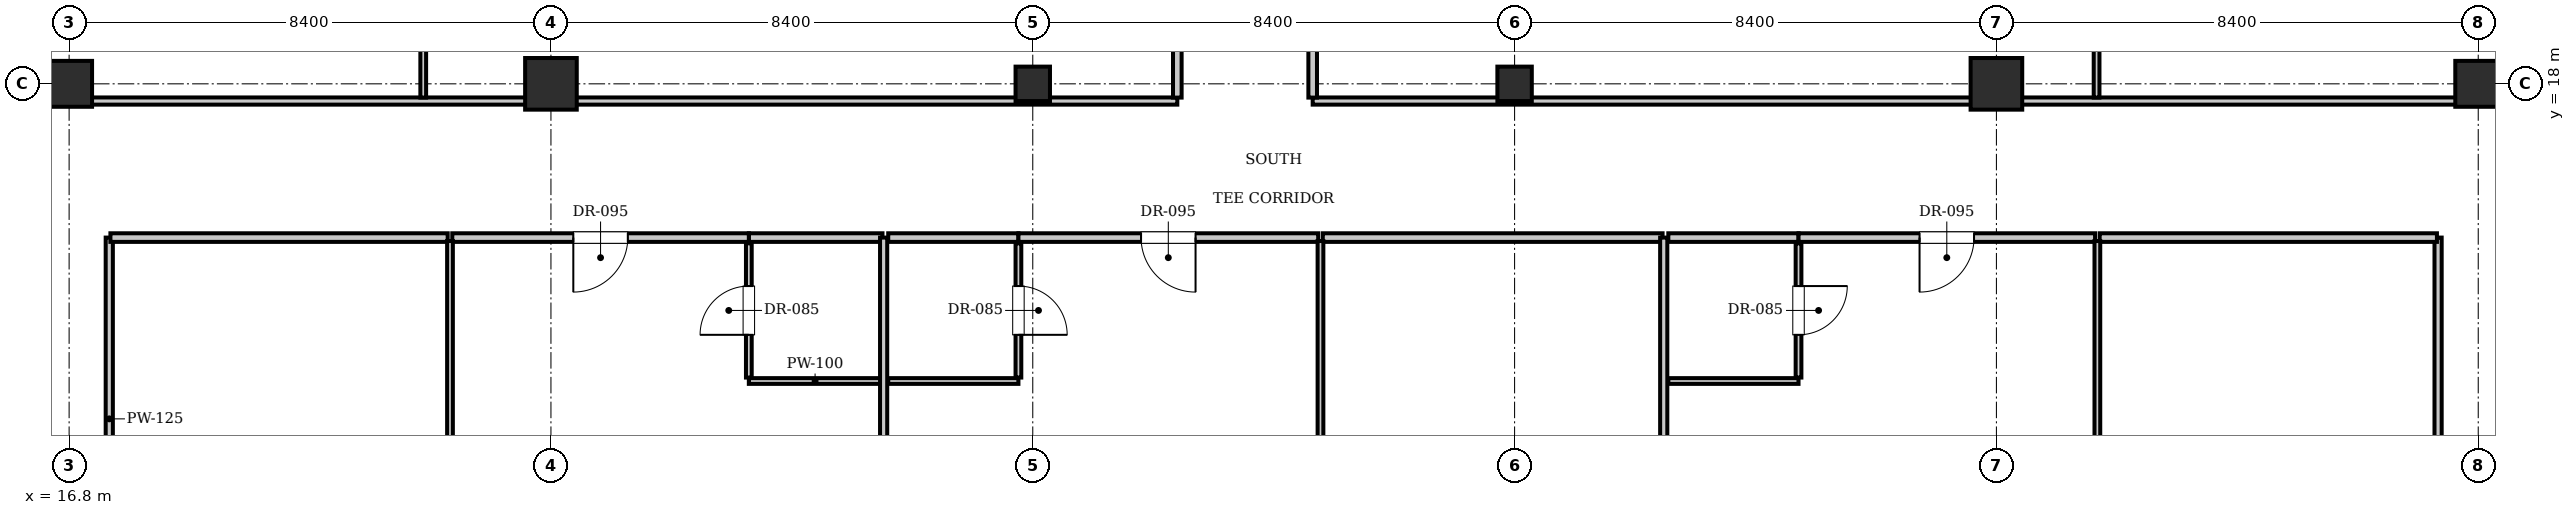
"""IFC4 building model, lengths in metres.
Left out: names, types, materials, properties, quantities, classifications, styles, units other than length and angle.
Written with IfcOpenShell. Run it as: python <this file> out.ifc"""

import sys

from ifc_helpers import new_model, si_unit, direction, frame, frame_2d, origin, origin_2d, place, context, subcontext, project, spatial, rectangle, i_section, extrude, element, fill, save


model = new_model("IFC4")
c1 = context("Model", 3, precision=1e-05, world=origin(), true_north=direction((0.0, 1.0)))
c2 = subcontext(c1, "Body", "Model", "MODEL_VIEW")
j1 = project(units=[si_unit("LENGTHUNIT", "METRE"), si_unit("PLANEANGLEUNIT", "RADIAN")], contexts=[c1])
p1 = place(None, origin())
s1 = spatial("IfcSite", under=j1, at=p1, CompositionType="ELEMENT")
p2 = place(p1, origin())
s2 = spatial("IfcBuilding", under=s1, at=p2, CompositionType="ELEMENT")
p3 = place(p2, frame((0.0, 0.0, 165.9)))
s3 = spatial("IfcBuildingStorey", under=s2, at=p3, CompositionType="ELEMENT", Elevation=165.9)
for number, where, z_axis, x_axis in (
    (1, (25.2, 18.0, 0.0), (0.0, 0.0, 1.0), (1.0, 0.0, 0.0)),
    (2, (50.4, 18.0, 0.0), (0.0, 0.0, 1.0), (1.0, 0.0, 0.0)),
):
    element("IfcColumn", number, at=place(p3, frame(where, z_axis=z_axis, x_axis=x_axis)), inside=s3, PredefinedType="COLUMN", context=c2, shape_type="SweptSolid", body=[
        extrude(rectangle(XDim=0.9, YDim=0.9, at=origin_2d()), origin(), (0.0, 0.0, 1.0), 3.85),
    ])
for number, where, z_axis, x_axis in (
    (3, (33.6, 18.0, 0.0), (0.0, 0.0, 1.0), (1.0, 0.0, 0.0)),
    (4, (42.0, 18.0, 0.0), (0.0, 0.0, 1.0), (1.0, 0.0, 0.0)),
):
    element("IfcColumn", number, at=place(p3, frame(where, z_axis=z_axis, x_axis=x_axis)), inside=s3, PredefinedType="COLUMN", context=c2, shape_type="SweptSolid", body=[
        extrude(i_section(OverallWidth=0.6, OverallDepth=0.6, WebThickness=0.025, FlangeThickness=0.038, at=origin_2d()), origin(), (0.0, 0.0, 1.0), 3.85),
    ])
for number, where, z_axis, x_axis in (
    (5, (16.8, 18.0, 0.0), (0.0, 0.0, 1.0), (1.0, 0.0, 0.0)),
    (6, (58.8, 18.0, 0.0), (0.0, 0.0, 1.0), (1.0, 0.0, 0.0)),
):
    element("IfcColumn", number, at=place(p3, frame(where, z_axis=z_axis, x_axis=x_axis)), inside=s3, PredefinedType="COLUMN", context=c2, shape_type="SweptSolid", body=[
        extrude(rectangle(XDim=0.8, YDim=0.8, at=origin_2d()), origin(), (0.0, 0.0, 1.0), 3.85),
    ])
for number, where, z_axis, x_axis in (
    (7, (17.5, 9.0, 0.0), (0.0, 0.0, 1.0), (0.0, 1.0, 0.0)),
    (8, (58.1, 9.0, 0.0), (0.0, 0.0, 1.0), (0.0, 1.0, 0.0)),
):
    element("IfcWall", number, at=place(p3, frame(where, z_axis=z_axis, x_axis=x_axis)), inside=s3, PredefinedType="PARTITIONING", context=c2, shape_type="SweptSolid", body=[
        extrude(rectangle(XDim=6.32, YDim=0.125, at=frame_2d((3.16, 0.0))), origin(), (0.0, 0.0, 1.0), 3.61),
    ])
p4 = place(p3, frame((28.65, 15.32, 0.0), z_axis=(0.0, 0.0, 1.0), x_axis=(1.0, 0.0, 0.0)))
e9 = element("IfcWall", 9, at=p4, inside=s3, PredefinedType="PARTITIONING", context=c2, shape_type="SweptSolid", body=[
    extrude(rectangle(XDim=2.33, YDim=0.15, at=frame_2d((1.165, 0.0))), origin(), (0.0, 0.0, 1.0), 3.61),
])
p5 = place(p3, frame((28.65, 12.82, 0.0), z_axis=(0.0, 0.0, 1.0), x_axis=(1.0, 0.0, 0.0)))
e10 = element("IfcWall", 10, at=p5, inside=s3, PredefinedType="PARTITIONING", context=c2, shape_type="SweptSolid", body=[
    extrude(rectangle(XDim=2.31, YDim=0.1, at=frame_2d((1.155, 0.0))), origin(), (0.0, 0.0, 1.0), 3.61),
])
p6 = place(p3, frame((28.65, 12.88, 0.0), z_axis=(0.0, 0.0, 1.0), x_axis=(0.0, 1.0, 0.0)))
e11 = element("IfcWall", 11, at=p6, inside=s3, PredefinedType="PARTITIONING", context=c2, shape_type="SweptSolid", body=[
    extrude(rectangle(XDim=2.34, YDim=0.1, at=frame_2d((1.17, 0.0))), origin(), (0.0, 0.0, 1.0), 3.61),
])
p7 = place(p6, frame((0.745, 0.0, 0.0)))
e12 = element("IfcOpeningElement", 12, at=p7, cuts=e11, PredefinedType="OPENING", context=c2, shape_type="SweptSolid", body=[
    extrude(rectangle(XDim=0.85, YDim=2.1, at=frame_2d((0.425, 1.05))), frame((0.0, 0.06, 0.0), z_axis=(0.0, -1.0, 0.0), x_axis=(1.0, 0.0, 0.0)), (0.0, 0.0, 1.0), 0.12),
])
p8 = place(p3, frame((17.52, 15.32, 0.0), z_axis=(0.0, 0.0, 1.0), x_axis=(1.0, 0.0, 0.0)))
e13 = element("IfcWall", 13, at=p8, inside=s3, PredefinedType="PARTITIONING", context=c2, shape_type="SweptSolid", body=[
    extrude(rectangle(XDim=5.88, YDim=0.15, at=frame_2d((2.94, 0.0))), origin(), (0.0, 0.0, 1.0), 3.61),
])
p9 = place(p3, frame((23.48, 15.32, 0.0), z_axis=(0.0, 0.0, 1.0), x_axis=(1.0, 0.0, 0.0)))
e14 = element("IfcWall", 14, at=p9, inside=s3, PredefinedType="PARTITIONING", context=c2, shape_type="SweptSolid", body=[
    extrude(rectangle(XDim=5.17, YDim=0.15, at=frame_2d((2.585, 0.0))), origin(), (0.0, 0.0, 1.0), 3.61),
])
p10 = place(p9, frame((2.11, 0.0, 0.0)))
e15 = element("IfcOpeningElement", 15, at=p10, cuts=e14, PredefinedType="OPENING", context=c2, shape_type="SweptSolid", body=[
    extrude(rectangle(XDim=0.95, YDim=2.15, at=frame_2d((0.475, 1.075))), frame((0.0, 0.085, 0.0), z_axis=(0.0, -1.0, 0.0), x_axis=(1.0, 0.0, 0.0)), (0.0, 0.0, 1.0), 0.17),
])
p11 = place(p3, frame((23.44, 4.63, 0.0), z_axis=(0.0, 0.0, 1.0), x_axis=(0.0, 1.0, 0.0)))
e16 = element("IfcWall", 16, at=p11, inside=s3, PredefinedType="PARTITIONING", context=c2, shape_type="SweptSolid", body=[
    extrude(rectangle(XDim=10.63, YDim=0.1, at=frame_2d((5.315, 0.0))), origin(), (0.0, 0.0, 1.0), 3.61),
])
p12 = place(p11, frame((1.6, 0.0, 0.0)))
e17 = element("IfcOpeningElement", 17, at=p12, cuts=e16, PredefinedType="OPENING", context=c2, shape_type="SweptSolid", body=[
    extrude(rectangle(XDim=0.9, YDim=2.1, at=frame_2d((0.45, 1.05))), frame((0.0, 0.06, 0.0), z_axis=(0.0, -1.0, 0.0), x_axis=(1.0, 0.0, 0.0)), (0.0, 0.0, 1.0), 0.12),
])
p13 = place(p3, frame((31.0, 4.7, 0.0), z_axis=(0.0, 0.0, 1.0), x_axis=(0.0, 1.0, 0.0)))
e18 = element("IfcWall", 18, at=p13, inside=s3, PredefinedType="PARTITIONING", context=c2, shape_type="SweptSolid", body=[
    extrude(rectangle(XDim=10.62, YDim=0.125, at=frame_2d((5.31, 0.0))), origin(), (0.0, 0.0, 1.0), 3.61),
])
p14 = place(p3, frame((31.08, 15.32, 0.0), z_axis=(0.0, 0.0, 1.0), x_axis=(1.0, 0.0, 0.0)))
e19 = element("IfcWall", 19, at=p14, inside=s3, PredefinedType="PARTITIONING", context=c2, shape_type="SweptSolid", body=[
    extrude(rectangle(XDim=2.27, YDim=0.15, at=frame_2d((1.135, 0.0))), origin(), (0.0, 0.0, 1.0), 3.61),
])
p15 = place(p3, frame((31.08, 12.82, 0.0), z_axis=(0.0, 0.0, 1.0), x_axis=(1.0, 0.0, 0.0)))
e20 = element("IfcWall", 20, at=p15, inside=s3, PredefinedType="PARTITIONING", context=c2, shape_type="SweptSolid", body=[
    extrude(rectangle(XDim=2.27, YDim=0.1, at=frame_2d((1.135, 0.0))), origin(), (0.0, 0.0, 1.0), 3.61),
])
p16 = place(p3, frame((33.35, 12.88, 0.0), z_axis=(0.0, 0.0, 1.0), x_axis=(0.0, 1.0, 0.0)))
e21 = element("IfcWall", 21, at=p16, inside=s3, PredefinedType="PARTITIONING", context=c2, shape_type="SweptSolid", body=[
    extrude(rectangle(XDim=2.34, YDim=0.1, at=frame_2d((1.17, 0.0))), origin(), (0.0, 0.0, 1.0), 3.61),
])
p17 = place(p16, frame((0.745, 0.0, 0.0)))
e22 = element("IfcOpeningElement", 22, at=p17, cuts=e21, PredefinedType="OPENING", context=c2, shape_type="SweptSolid", body=[
    extrude(rectangle(XDim=0.85, YDim=2.1, at=frame_2d((0.425, 1.05))), frame((0.0, 0.06, 0.0), z_axis=(0.0, -1.0, 0.0), x_axis=(1.0, 0.0, 0.0)), (0.0, 0.0, 1.0), 0.12),
])
p18 = place(p3, frame((33.35, 15.32, 0.0), z_axis=(0.0, 0.0, 1.0), x_axis=(1.0, 0.0, 0.0)))
e23 = element("IfcWall", 23, at=p18, inside=s3, PredefinedType="PARTITIONING", context=c2, shape_type="SweptSolid", body=[
    extrude(rectangle(XDim=5.226, YDim=0.15, at=frame_2d((2.613, 0.0))), origin(), (0.0, 0.0, 1.0), 3.61),
])
p19 = place(p18, frame((2.138, 0.0, 0.0)))
e24 = element("IfcOpeningElement", 24, at=p19, cuts=e23, PredefinedType="OPENING", context=c2, shape_type="SweptSolid", body=[
    extrude(rectangle(XDim=0.95, YDim=2.15, at=frame_2d((0.475, 1.075))), frame((0.0, 0.085, 0.0), z_axis=(0.0, -1.0, 0.0), x_axis=(1.0, 0.0, 0.0)), (0.0, 0.0, 1.0), 0.17),
])
p20 = place(p3, frame((38.656, 15.32, 0.0), z_axis=(0.0, 0.0, 1.0), x_axis=(1.0, 0.0, 0.0)))
e25 = element("IfcWall", 25, at=p20, inside=s3, PredefinedType="PARTITIONING", context=c2, shape_type="SweptSolid", body=[
    extrude(rectangle(XDim=5.924, YDim=0.15, at=frame_2d((2.962, 0.0))), origin(), (0.0, 0.0, 1.0), 3.61),
])
p21 = place(p3, frame((38.616, 4.63, 0.0), z_axis=(0.0, 0.0, 1.0), x_axis=(0.0, 1.0, 0.0)))
e26 = element("IfcWall", 26, at=p21, inside=s3, PredefinedType="PARTITIONING", context=c2, shape_type="SweptSolid", body=[
    extrude(rectangle(XDim=10.63, YDim=0.1, at=frame_2d((5.315, 0.0))), origin(), (0.0, 0.0, 1.0), 3.61),
])
p22 = place(p21, frame((1.6, 0.0, 0.0)))
e27 = element("IfcOpeningElement", 27, at=p22, cuts=e26, PredefinedType="OPENING", context=c2, shape_type="SweptSolid", body=[
    extrude(rectangle(XDim=0.9, YDim=2.1, at=frame_2d((0.45, 1.05))), frame((0.0, 0.06, 0.0), z_axis=(0.0, -1.0, 0.0), x_axis=(1.0, 0.0, 0.0)), (0.0, 0.0, 1.0), 0.12),
])
p23 = place(p3, frame((44.6, 4.7, 0.0), z_axis=(0.0, 0.0, 1.0), x_axis=(0.0, 1.0, 0.0)))
e28 = element("IfcWall", 28, at=p23, inside=s3, PredefinedType="PARTITIONING", context=c2, shape_type="SweptSolid", body=[
    extrude(rectangle(XDim=10.62, YDim=0.125, at=frame_2d((5.31, 0.0))), origin(), (0.0, 0.0, 1.0), 3.61),
])
p24 = place(p3, frame((44.68, 15.32, 0.0), z_axis=(0.0, 0.0, 1.0), x_axis=(1.0, 0.0, 0.0)))
e29 = element("IfcWall", 29, at=p24, inside=s3, PredefinedType="PARTITIONING", context=c2, shape_type="SweptSolid", body=[
    extrude(rectangle(XDim=2.27, YDim=0.15, at=frame_2d((1.135, 0.0))), origin(), (0.0, 0.0, 1.0), 3.61),
])
p25 = place(p3, frame((44.68, 12.82, 0.0), z_axis=(0.0, 0.0, 1.0), x_axis=(1.0, 0.0, 0.0)))
e30 = element("IfcWall", 30, at=p25, inside=s3, PredefinedType="PARTITIONING", context=c2, shape_type="SweptSolid", body=[
    extrude(rectangle(XDim=2.27, YDim=0.1, at=frame_2d((1.135, 0.0))), origin(), (0.0, 0.0, 1.0), 3.61),
])
p26 = place(p3, frame((46.95, 12.88, 0.0), z_axis=(0.0, 0.0, 1.0), x_axis=(0.0, 1.0, 0.0)))
e31 = element("IfcWall", 31, at=p26, inside=s3, PredefinedType="PARTITIONING", context=c2, shape_type="SweptSolid", body=[
    extrude(rectangle(XDim=2.34, YDim=0.1, at=frame_2d((1.17, 0.0))), origin(), (0.0, 0.0, 1.0), 3.61),
])
p27 = place(p26, frame((0.745, 0.0, 0.0)))
e32 = element("IfcOpeningElement", 32, at=p27, cuts=e31, PredefinedType="OPENING", context=c2, shape_type="SweptSolid", body=[
    extrude(rectangle(XDim=0.85, YDim=2.1, at=frame_2d((0.425, 1.05))), frame((0.0, 0.06, 0.0), z_axis=(0.0, -1.0, 0.0), x_axis=(1.0, 0.0, 0.0)), (0.0, 0.0, 1.0), 0.12),
])
p28 = place(p3, frame((46.95, 15.32, 0.0), z_axis=(0.0, 0.0, 1.0), x_axis=(1.0, 0.0, 0.0)))
e33 = element("IfcWall", 33, at=p28, inside=s3, PredefinedType="PARTITIONING", context=c2, shape_type="SweptSolid", body=[
    extrude(rectangle(XDim=5.17, YDim=0.15, at=frame_2d((2.585, 0.0))), origin(), (0.0, 0.0, 1.0), 3.61),
])
p29 = place(p28, frame((2.11, 0.0, 0.0)))
e34 = element("IfcOpeningElement", 34, at=p29, cuts=e33, PredefinedType="OPENING", context=c2, shape_type="SweptSolid", body=[
    extrude(rectangle(XDim=0.95, YDim=2.15, at=frame_2d((0.475, 1.075))), frame((0.0, 0.085, 0.0), z_axis=(0.0, -1.0, 0.0), x_axis=(1.0, 0.0, 0.0)), (0.0, 0.0, 1.0), 0.17),
])
p30 = place(p3, frame((52.2, 15.32, 0.0), z_axis=(0.0, 0.0, 1.0), x_axis=(1.0, 0.0, 0.0)))
e35 = element("IfcWall", 35, at=p30, inside=s3, PredefinedType="PARTITIONING", context=c2, shape_type="SweptSolid", body=[
    extrude(rectangle(XDim=5.88, YDim=0.15, at=frame_2d((2.94, 0.0))), origin(), (0.0, 0.0, 1.0), 3.61),
])
p31 = place(p3, frame((52.16, 4.63, 0.0), z_axis=(0.0, 0.0, 1.0), x_axis=(0.0, 1.0, 0.0)))
e36 = element("IfcWall", 36, at=p31, inside=s3, PredefinedType="PARTITIONING", context=c2, shape_type="SweptSolid", body=[
    extrude(rectangle(XDim=10.63, YDim=0.1, at=frame_2d((5.315, 0.0))), origin(), (0.0, 0.0, 1.0), 3.61),
])
p32 = place(p31, frame((1.6, 0.0, 0.0)))
e37 = element("IfcOpeningElement", 37, at=p32, cuts=e36, PredefinedType="OPENING", context=c2, shape_type="SweptSolid", body=[
    extrude(rectangle(XDim=0.9, YDim=2.1, at=frame_2d((0.45, 1.05))), frame((0.0, 0.06, 0.0), z_axis=(0.0, -1.0, 0.0), x_axis=(1.0, 0.0, 0.0)), (0.0, 0.0, 1.0), 0.12),
])
p33 = place(p3, frame((13.2, 17.7, 0.0), z_axis=(0.0, 0.0, 1.0), x_axis=(1.0, 0.0, 0.0)))
e38 = element("IfcWall", 38, at=p33, inside=s3, PredefinedType="PARTITIONING", context=c2, shape_type="SweptSolid", body=[
    extrude(rectangle(XDim=22.92, YDim=0.125, at=frame_2d((11.46, 0.0))), origin(), (0.0, 0.0, 1.0), 3.61),
])
p34 = place(p3, frame((38.48, 17.7, 0.0), z_axis=(0.0, 0.0, 1.0), x_axis=(1.0, 0.0, 0.0)))
e39 = element("IfcWall", 39, at=p34, inside=s3, PredefinedType="PARTITIONING", context=c2, shape_type="SweptSolid", body=[
    extrude(rectangle(XDim=23.92, YDim=0.125, at=frame_2d((11.96, 0.0))), origin(), (0.0, 0.0, 1.0), 3.61),
])
p35 = place(p3, frame((36.12, 17.76, 0.0), z_axis=(0.0, 0.0, 1.0), x_axis=(0.0, 1.0, 0.0)))
e40 = element("IfcWall", 40, at=p35, inside=s3, PredefinedType="PARTITIONING", context=c2, shape_type="SweptSolid", body=[
    extrude(rectangle(XDim=4.24, YDim=0.15, at=frame_2d((2.12, 0.0))), origin(), (0.0, 0.0, 1.0), 3.61),
])
p36 = place(p35, frame((1.645, 0.0, 0.0)))
e41 = element("IfcOpeningElement", 41, at=p36, cuts=e40, PredefinedType="OPENING", context=c2, shape_type="SweptSolid", body=[
    extrude(rectangle(XDim=0.95, YDim=2.15, at=frame_2d((0.475, 1.075))), frame((0.0, 0.085, 0.0), z_axis=(0.0, -1.0, 0.0), x_axis=(1.0, 0.0, 0.0)), (0.0, 0.0, 1.0), 0.17),
])
p37 = place(p3, frame((22.974, 17.76, 0.0), z_axis=(0.0, 0.0, 1.0), x_axis=(0.0, 1.0, 0.0)))
e42 = element("IfcWall", 42, at=p37, inside=s3, PredefinedType="PARTITIONING", context=c2, shape_type="SweptSolid", body=[
    extrude(rectangle(XDim=6.53, YDim=0.1, at=frame_2d((3.265, 0.0))), origin(), (0.0, 0.0, 1.0), 3.61),
])
p38 = place(p37, frame((2.815, 0.0, 0.0)))
e43 = element("IfcOpeningElement", 43, at=p38, cuts=e42, PredefinedType="OPENING", context=c2, shape_type="SweptSolid", body=[
    extrude(rectangle(XDim=0.9, YDim=2.1, at=frame_2d((0.45, 1.05))), frame((0.0, 0.06, 0.0), z_axis=(0.0, -1.0, 0.0), x_axis=(1.0, 0.0, 0.0)), (0.0, 0.0, 1.0), 0.12),
])
p39 = place(p3, frame((38.48, 17.76, 0.0), z_axis=(0.0, 0.0, 1.0), x_axis=(0.0, 1.0, 0.0)))
e44 = element("IfcWall", 44, at=p39, inside=s3, PredefinedType="PARTITIONING", context=c2, shape_type="SweptSolid", body=[
    extrude(rectangle(XDim=4.24, YDim=0.15, at=frame_2d((2.12, 0.0))), origin(), (0.0, 0.0, 1.0), 3.61),
])
p40 = place(p39, frame((1.645, 0.0, 0.0)))
e45 = element("IfcOpeningElement", 45, at=p40, cuts=e44, PredefinedType="OPENING", context=c2, shape_type="SweptSolid", body=[
    extrude(rectangle(XDim=0.95, YDim=2.15, at=frame_2d((0.475, 1.075))), frame((0.0, 0.085, 0.0), z_axis=(0.0, -1.0, 0.0), x_axis=(1.0, 0.0, 0.0)), (0.0, 0.0, 1.0), 0.17),
])
p41 = place(p3, frame((52.146, 17.76, 0.0), z_axis=(0.0, 0.0, 1.0), x_axis=(0.0, 1.0, 0.0)))
e46 = element("IfcWall", 46, at=p41, inside=s3, PredefinedType="PARTITIONING", context=c2, shape_type="SweptSolid", body=[
    extrude(rectangle(XDim=6.53, YDim=0.1, at=frame_2d((3.265, 0.0))), origin(), (0.0, 0.0, 1.0), 3.61),
])
p42 = place(p41, frame((2.815, 0.0, 0.0)))
e47 = element("IfcOpeningElement", 47, at=p42, cuts=e46, PredefinedType="OPENING", context=c2, shape_type="SweptSolid", body=[
    extrude(rectangle(XDim=0.9, YDim=2.1, at=frame_2d((0.45, 1.05))), frame((0.0, 0.06, 0.0), z_axis=(0.0, -1.0, 0.0), x_axis=(1.0, 0.0, 0.0)), (0.0, 0.0, 1.0), 0.12),
])
p43 = place(p7, origin())
e48 = element("IfcDoor", 48, at=p43, inside=s3, OperationType="SINGLE_SWING_LEFT", PredefinedType="DOOR", context=c2, shape_type="SweptSolid", body=[
    extrude(rectangle(XDim=0.85, YDim=2.1, at=frame_2d((0.425, 1.05))), frame((0.0, 0.025, 0.0), z_axis=(0.0, -1.0, 0.0), x_axis=(1.0, 0.0, 0.0)), (0.0, 0.0, 1.0), 0.05),
])
fill(e12, e48)
p44 = place(p10, frame((0.95, 0.0, 0.0), z_axis=(0.0, 0.0, 1.0), x_axis=(-1.0, 0.0, 0.0)))
e49 = element("IfcDoor", 49, at=p44, inside=s3, OperationType="SINGLE_SWING_RIGHT", PredefinedType="DOOR", context=c2, shape_type="SweptSolid", body=[
    extrude(rectangle(XDim=0.95, YDim=2.15, at=frame_2d((0.475, 1.075))), frame((0.0, 0.025, 0.0), z_axis=(0.0, -1.0, 0.0), x_axis=(1.0, 0.0, 0.0)), (0.0, 0.0, 1.0), 0.05),
])
fill(e15, e49)
p45 = place(p17, frame((0.85, 0.0, 0.0), z_axis=(0.0, 0.0, 1.0), x_axis=(-1.0, 0.0, 0.0)))
e50 = element("IfcDoor", 50, at=p45, inside=s3, OperationType="SINGLE_SWING_RIGHT", PredefinedType="DOOR", context=c2, shape_type="SweptSolid", body=[
    extrude(rectangle(XDim=0.85, YDim=2.1, at=frame_2d((0.425, 1.05))), frame((0.0, 0.025, 0.0), z_axis=(0.0, -1.0, 0.0), x_axis=(1.0, 0.0, 0.0)), (0.0, 0.0, 1.0), 0.05),
])
fill(e22, e50)
p46 = place(p19, frame((0.95, 0.0, 0.0), z_axis=(0.0, 0.0, 1.0), x_axis=(-1.0, 0.0, 0.0)))
e51 = element("IfcDoor", 51, at=p46, inside=s3, OperationType="SINGLE_SWING_LEFT", PredefinedType="DOOR", context=c2, shape_type="SweptSolid", body=[
    extrude(rectangle(XDim=0.95, YDim=2.15, at=frame_2d((0.475, 1.075))), frame((0.0, 0.025, 0.0), z_axis=(0.0, -1.0, 0.0), x_axis=(1.0, 0.0, 0.0)), (0.0, 0.0, 1.0), 0.05),
])
fill(e24, e51)
p47 = place(p27, frame((0.85, 0.0, 0.0), z_axis=(0.0, 0.0, 1.0), x_axis=(-1.0, 0.0, 0.0)))
e52 = element("IfcDoor", 52, at=p47, inside=s3, OperationType="SINGLE_SWING_LEFT", PredefinedType="DOOR", context=c2, shape_type="SweptSolid", body=[
    extrude(rectangle(XDim=0.85, YDim=2.1, at=frame_2d((0.425, 1.05))), frame((0.0, 0.025, 0.0), z_axis=(0.0, -1.0, 0.0), x_axis=(1.0, 0.0, 0.0)), (0.0, 0.0, 1.0), 0.05),
])
fill(e32, e52)
p48 = place(p29, frame((0.95, 0.0, 0.0), z_axis=(0.0, 0.0, 1.0), x_axis=(-1.0, 0.0, 0.0)))
e53 = element("IfcDoor", 53, at=p48, inside=s3, OperationType="SINGLE_SWING_RIGHT", PredefinedType="DOOR", context=c2, shape_type="SweptSolid", body=[
    extrude(rectangle(XDim=0.95, YDim=2.15, at=frame_2d((0.475, 1.075))), frame((0.0, 0.025, 0.0), z_axis=(0.0, -1.0, 0.0), x_axis=(1.0, 0.0, 0.0)), (0.0, 0.0, 1.0), 0.05),
])
fill(e34, e53)
save(model, sys.argv[1])
